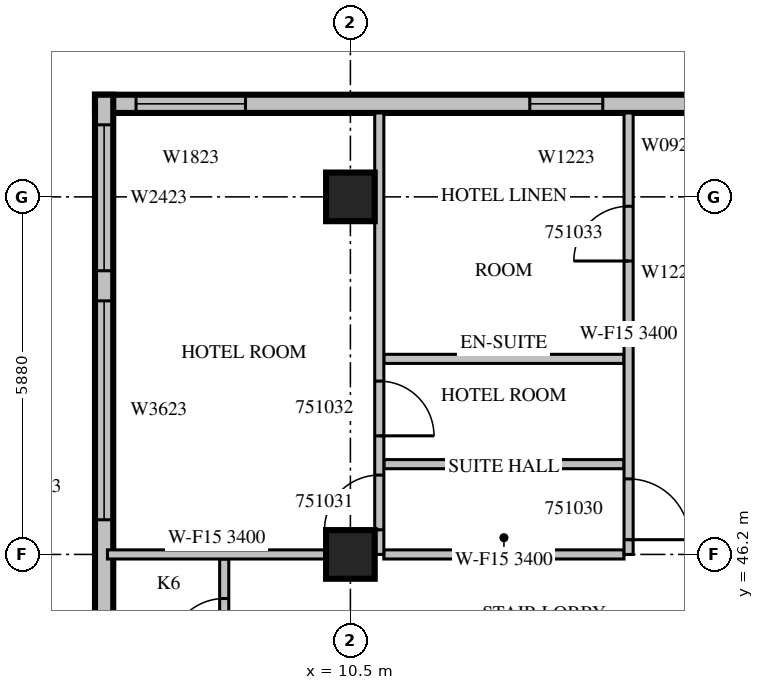
"""IFC4 building model, lengths in metres.
Left out: names, types, materials, properties, quantities, classifications, styles, units other than length and angle.
Written with IfcOpenShell. Run it as: python <this file> out.ifc"""

import sys

from ifc_helpers import new_model, si_unit, direction, frame, frame_2d, origin, origin_2d, place, context, subcontext, project, spatial, rectangle, extrude, source, transform, mapped, element, fill, save


model = new_model("IFC4")
c1 = context("Model", 3, precision=1e-05, world=origin(), true_north=direction((0.0, 1.0)))
c2 = subcontext(c1, "Body", "Model", "MODEL_VIEW")
j1 = project(units=[si_unit("LENGTHUNIT", "METRE"), si_unit("PLANEANGLEUNIT", "RADIAN")], contexts=[c1])
p1 = place(None, origin())
s1 = spatial("IfcSite", under=j1, at=p1, CompositionType="ELEMENT")
p2 = place(p1, origin())
s2 = spatial("IfcBuilding", under=s1, at=p2, CompositionType="ELEMENT")
p3 = place(p2, frame((0.0, 0.0, 227.2)))
s3 = spatial("IfcBuildingStorey", under=s2, at=p3, CompositionType="ELEMENT", Elevation=227.2)
m1 = source(origin(), c2, "Body", "SweptSolid", [
    extrude(rectangle(XDim=0.8, YDim=0.8, at=origin_2d()), origin(), (0.0, 0.0, 1.0), 3.8),
])
for number, where, z_axis, x_axis in (
    (1, (10.5, 46.2, 0.0), (0.0, 0.0, 1.0), (1.0, 0.0, 0.0)),
    (2, (10.5, 52.08, 0.0), (0.0, 0.0, 1.0), (1.0, 0.0, 0.0)),
):
    element("IfcColumn", number, at=place(p3, frame(where, z_axis=z_axis, x_axis=x_axis)), inside=s3, PredefinedType="COLUMN", context=c2, shape_type="MappedRepresentation", body=[
        mapped(m1, transform((0.0, 0.0, 0.0), scale=1.0)),
    ])
m2 = source(origin(), c2, "Body", "SweptSolid", [
    extrude(rectangle(XDim=10.5, YDim=0.3, at=frame_2d((5.25, 0.0))), origin(), (0.0, 0.0, 1.0), 3.4),
])
p4 = place(p3, frame((16.8, 53.61, 0.0), z_axis=(0.0, 0.0, 1.0), x_axis=(-1.0, 0.0, 0.0)))
e3 = element("IfcWall", 3, at=p4, inside=s3, PredefinedType="STANDARD", context=c2, shape_type="MappedRepresentation", body=[
    mapped(m2, transform((0.0, 0.0, 0.0), scale=1.0)),
])
m3 = source(origin(), c2, "Body", "SweptSolid", [
    extrude(rectangle(XDim=1.2, YDim=2.3, at=frame_2d((0.6, 1.15))), frame((0.0, 0.16, 0.0), z_axis=(0.0, -1.0, 0.0), x_axis=(1.0, 0.0, 0.0)), (0.0, 0.0, 1.0), 0.32),
])
p5 = place(p4, frame((2.15, 0.0, 0.6)))
e4 = element("IfcOpeningElement", 4, at=p5, cuts=e3, PredefinedType="OPENING", context=c2, shape_type="MappedRepresentation", body=[
    mapped(m3, transform((0.0, 0.0, 0.0), scale=1.0)),
])
m4 = source(origin(), c2, "Body", "SweptSolid", [
    extrude(rectangle(XDim=1.8, YDim=2.3, at=frame_2d((0.9, 1.15))), frame((0.0, 0.16, 0.0), z_axis=(0.0, -1.0, 0.0), x_axis=(1.0, 0.0, 0.0)), (0.0, 0.0, 1.0), 0.32),
])
p6 = place(p4, frame((8.025, 0.0, 0.6)))
e5 = element("IfcOpeningElement", 5, at=p6, cuts=e3, PredefinedType="OPENING", context=c2, shape_type="MappedRepresentation", body=[
    mapped(m4, transform((0.0, 0.0, 0.0), scale=1.0)),
])
m5 = source(origin(), c2, "Body", "SweptSolid", [
    extrude(rectangle(XDim=9.91, YDim=0.3, at=frame_2d((4.955, 0.0))), origin(), (0.0, 0.0, 1.0), 3.4),
])
p7 = place(p3, frame((6.45, 53.76, 0.0), z_axis=(0.0, 0.0, 1.0), x_axis=(0.0, -1.0, 0.0)))
e6 = element("IfcWall", 6, at=p7, inside=s3, PredefinedType="STANDARD", context=c2, shape_type="MappedRepresentation", body=[
    mapped(m5, transform((0.0, 0.0, 0.0), scale=1.0)),
])
m6 = source(origin(), c2, "Body", "SweptSolid", [
    extrude(rectangle(XDim=3.6, YDim=2.3, at=frame_2d((1.8, 1.15))), frame((0.0, 0.16, 0.0), z_axis=(0.0, -1.0, 0.0), x_axis=(1.0, 0.0, 0.0)), (0.0, 0.0, 1.0), 0.32),
])
p8 = place(p7, frame((3.39, 0.0, 0.6)))
e7 = element("IfcOpeningElement", 7, at=p8, cuts=e6, PredefinedType="OPENING", context=c2, shape_type="MappedRepresentation", body=[
    mapped(m6, transform((0.0, 0.0, 0.0), scale=1.0)),
])
m7 = source(origin(), c2, "Body", "SweptSolid", [
    extrude(rectangle(XDim=2.4, YDim=2.3, at=frame_2d((1.2, 1.15))), frame((0.0, 0.16, 0.0), z_axis=(0.0, -1.0, 0.0), x_axis=(1.0, 0.0, 0.0)), (0.0, 0.0, 1.0), 0.32),
])
p9 = place(p7, frame((0.495, 0.0, 0.6)))
e8 = element("IfcOpeningElement", 8, at=p9, cuts=e6, PredefinedType="OPENING", context=c2, shape_type="MappedRepresentation", body=[
    mapped(m7, transform((0.0, 0.0, 0.0), scale=1.0)),
])
m8 = source(origin(), c2, "Body", "SweptSolid", [
    extrude(rectangle(XDim=2.2, YDim=0.15, at=frame_2d((1.1, 0.0))), origin(), (0.0, 0.0, 1.0), 3.4),
])
p10 = place(p3, frame((8.425, 43.925, 0.0), z_axis=(0.0, 0.0, 1.0), x_axis=(0.0, 1.0, 0.0)))
e9 = element("IfcWall", 9, at=p10, inside=s3, PredefinedType="PARTITIONING", context=c2, shape_type="MappedRepresentation", body=[
    mapped(m8, transform((0.0, 0.0, 0.0), scale=1.0)),
])
m9 = source(origin(), c2, "Body", "SweptSolid", [
    extrude(rectangle(XDim=0.9, YDim=2.1, at=frame_2d((0.45, 1.05))), frame((0.0, 0.085, 0.0), z_axis=(0.0, -1.0, 0.0), x_axis=(1.0, 0.0, 0.0)), (0.0, 0.0, 1.0), 0.17),
])
p11 = place(p10, frame((0.65, 0.0, 0.0)))
e10 = element("IfcOpeningElement", 10, at=p11, cuts=e9, PredefinedType="OPENING", context=c2, shape_type="MappedRepresentation", body=[
    mapped(m9, transform((0.0, 0.0, 0.0), scale=1.0)),
])
m10 = source(origin(), c2, "Body", "SweptSolid", [
    extrude(rectangle(XDim=3.95, YDim=0.15, at=frame_2d((1.975, 0.0))), origin(), (0.0, 0.0, 1.0), 3.4),
])
for number, where, z_axis, x_axis in (
    (11, (15.0, 47.684, 0.0), (0.0, 0.0, 1.0), (-1.0, 0.0, 0.0)),
    (12, (15.0, 49.416, 0.0), (0.0, 0.0, 1.0), (-1.0, 0.0, 0.0)),
):
    element("IfcWall", number, at=place(p3, frame(where, z_axis=z_axis, x_axis=x_axis)), inside=s3, PredefinedType="PARTITIONING", context=c2, shape_type="MappedRepresentation", body=[
        mapped(m10, transform((0.0, 0.0, 0.0), scale=1.0)),
    ])
m11 = source(origin(), c2, "Body", "SweptSolid", [
    extrude(rectangle(XDim=3.596, YDim=0.15, at=frame_2d((1.798, 0.0))), origin(), (0.0, 0.0, 1.0), 3.4),
])
p12 = place(p3, frame((10.101, 46.2, 0.0), z_axis=(0.0, 0.0, 1.0), x_axis=(-1.0, 0.0, 0.0)))
e13 = element("IfcWall", 13, at=p12, inside=s3, PredefinedType="PARTITIONING", context=c2, shape_type="MappedRepresentation", body=[
    mapped(m11, transform((0.0, 0.0, 0.0), scale=1.0)),
])
p13 = place(p3, frame((15.0, 46.2, 0.0), z_axis=(0.0, 0.0, 1.0), x_axis=(-1.0, 0.0, 0.0)))
e14 = element("IfcWall", 14, at=p13, inside=s3, PredefinedType="PARTITIONING", context=c2, shape_type="MappedRepresentation", body=[
    mapped(m10, transform((0.0, 0.0, 0.0), scale=1.0)),
])
m12 = source(origin(), c2, "Body", "SweptSolid", [
    extrude(rectangle(XDim=7.26, YDim=0.15, at=frame_2d((3.63, 0.0))), origin(), (0.0, 0.0, 1.0), 3.4),
])
p14 = place(p3, frame((10.975, 46.2, 0.0), z_axis=(0.0, 0.0, 1.0), x_axis=(0.0, 1.0, 0.0)))
e15 = element("IfcWall", 15, at=p14, inside=s3, PredefinedType="PARTITIONING", context=c2, shape_type="MappedRepresentation", body=[
    mapped(m12, transform((0.0, 0.0, 0.0), scale=1.0)),
])
p15 = place(p14, frame((0.405, 0.0, 0.0)))
e16 = element("IfcOpeningElement", 16, at=p15, cuts=e15, PredefinedType="OPENING", context=c2, shape_type="MappedRepresentation", body=[
    mapped(m9, transform((0.0, 0.0, 0.0), scale=1.0)),
])
p16 = place(p14, frame((1.95, 0.0, 0.0)))
e17 = element("IfcOpeningElement", 17, at=p16, cuts=e15, PredefinedType="OPENING", context=c2, shape_type="MappedRepresentation", body=[
    mapped(m9, transform((0.0, 0.0, 0.0), scale=1.0)),
])
p17 = place(p3, frame((15.075, 46.2, 0.0), z_axis=(0.0, 0.0, 1.0), x_axis=(0.0, 1.0, 0.0)))
e18 = element("IfcWall", 18, at=p17, inside=s3, PredefinedType="PARTITIONING", context=c2, shape_type="MappedRepresentation", body=[
    mapped(m12, transform((0.0, 0.0, 0.0), scale=1.0)),
])
m13 = source(origin(), c2, "Body", "SweptSolid", [
    extrude(rectangle(XDim=1.0, YDim=2.1, at=frame_2d((0.5, 1.05))), frame((0.0, 0.085, 0.0), z_axis=(0.0, -1.0, 0.0), x_axis=(1.0, 0.0, 0.0)), (0.0, 0.0, 1.0), 0.17),
])
p18 = place(p17, frame((0.242, 0.0, 0.0)))
e19 = element("IfcOpeningElement", 19, at=p18, cuts=e18, PredefinedType="OPENING", context=c2, shape_type="MappedRepresentation", body=[
    mapped(m13, transform((0.0, 0.0, 0.0), scale=1.0)),
])
p19 = place(p17, frame((4.825, 0.0, 0.0)))
e20 = element("IfcOpeningElement", 20, at=p19, cuts=e18, PredefinedType="OPENING", context=c2, shape_type="MappedRepresentation", body=[
    mapped(m9, transform((0.0, 0.0, 0.0), scale=1.0)),
])
m14 = source(origin(), c2, "Body", "SweptSolid", [
    extrude(rectangle(XDim=1.2, YDim=2.3, at=frame_2d((0.6, 1.15))), frame((0.0, 0.03, 0.0), z_axis=(0.0, -1.0, 0.0), x_axis=(1.0, 0.0, 0.0)), (0.0, 0.0, 1.0), 0.06),
])
p20 = place(p5, origin())
e21 = element("IfcWindow", 21, at=p20, inside=s3, PartitioningType="SINGLE_PANEL", PredefinedType="WINDOW", context=c2, shape_type="MappedRepresentation", body=[
    mapped(m14, transform((0.0, 0.0, 0.0), scale=1.0)),
])
fill(e4, e21)
m15 = source(origin(), c2, "Body", "SweptSolid", [
    extrude(rectangle(XDim=1.8, YDim=2.3, at=frame_2d((0.9, 1.15))), frame((0.0, 0.03, 0.0), z_axis=(0.0, -1.0, 0.0), x_axis=(1.0, 0.0, 0.0)), (0.0, 0.0, 1.0), 0.06),
])
p21 = place(p6, origin())
e22 = element("IfcWindow", 22, at=p21, inside=s3, PartitioningType="SINGLE_PANEL", PredefinedType="WINDOW", context=c2, shape_type="MappedRepresentation", body=[
    mapped(m15, transform((0.0, 0.0, 0.0), scale=1.0)),
])
fill(e5, e22)
m16 = source(origin(), c2, "Body", "SweptSolid", [
    extrude(rectangle(XDim=3.6, YDim=2.3, at=frame_2d((1.8, 1.15))), frame((0.0, 0.03, 0.0), z_axis=(0.0, -1.0, 0.0), x_axis=(1.0, 0.0, 0.0)), (0.0, 0.0, 1.0), 0.06),
])
p22 = place(p8, origin())
e23 = element("IfcWindow", 23, at=p22, inside=s3, PartitioningType="SINGLE_PANEL", PredefinedType="WINDOW", context=c2, shape_type="MappedRepresentation", body=[
    mapped(m16, transform((0.0, 0.0, 0.0), scale=1.0)),
])
fill(e7, e23)
m17 = source(origin(), c2, "Body", "SweptSolid", [
    extrude(rectangle(XDim=2.4, YDim=2.3, at=frame_2d((1.2, 1.15))), frame((0.0, 0.03, 0.0), z_axis=(0.0, -1.0, 0.0), x_axis=(1.0, 0.0, 0.0)), (0.0, 0.0, 1.0), 0.06),
])
p23 = place(p9, origin())
e24 = element("IfcWindow", 24, at=p23, inside=s3, PartitioningType="SINGLE_PANEL", PredefinedType="WINDOW", context=c2, shape_type="MappedRepresentation", body=[
    mapped(m17, transform((0.0, 0.0, 0.0), scale=1.0)),
])
fill(e8, e24)
m18 = source(origin(), c2, "Body", "SweptSolid", [
    extrude(rectangle(XDim=0.9, YDim=2.1, at=frame_2d((0.45, 1.05))), frame((0.0, 0.025, 0.0), z_axis=(0.0, -1.0, 0.0), x_axis=(1.0, 0.0, 0.0)), (0.0, 0.0, 1.0), 0.05),
])
p24 = place(p11, origin())
e25 = element("IfcDoor", 25, at=p24, inside=s3, OperationType="SINGLE_SWING_LEFT", PredefinedType="DOOR", context=c2, shape_type="MappedRepresentation", body=[
    mapped(m18, transform((0.0, 0.0, 0.0), scale=1.0)),
])
fill(e10, e25)
m19 = source(origin(), c2, "Body", "SweptSolid", [
    extrude(rectangle(XDim=1.0, YDim=2.1, at=frame_2d((0.5, 1.05))), frame((0.0, 0.025, 0.0), z_axis=(0.0, -1.0, 0.0), x_axis=(1.0, 0.0, 0.0)), (0.0, 0.0, 1.0), 0.05),
])
p25 = place(p18, origin())
e26 = element("IfcDoor", 26, at=p25, inside=s3, OperationType="SINGLE_SWING_RIGHT", PredefinedType="DOOR", context=c2, shape_type="MappedRepresentation", body=[
    mapped(m19, transform((0.0, 0.0, 0.0), scale=1.0)),
])
fill(e19, e26)
p26 = place(p15, origin())
e27 = element("IfcDoor", 27, at=p26, inside=s3, OperationType="SINGLE_SWING_LEFT", PredefinedType="DOOR", context=c2, shape_type="MappedRepresentation", body=[
    mapped(m18, transform((0.0, 0.0, 0.0), scale=1.0)),
])
fill(e16, e27)
p27 = place(p16, origin())
e28 = element("IfcDoor", 28, at=p27, inside=s3, OperationType="SINGLE_SWING_RIGHT", PredefinedType="DOOR", context=c2, shape_type="MappedRepresentation", body=[
    mapped(m18, transform((0.0, 0.0, 0.0), scale=1.0)),
])
fill(e17, e28)
p28 = place(p19, origin())
e29 = element("IfcDoor", 29, at=p28, inside=s3, OperationType="SINGLE_SWING_LEFT", PredefinedType="DOOR", context=c2, shape_type="MappedRepresentation", body=[
    mapped(m18, transform((0.0, 0.0, 0.0), scale=1.0)),
])
fill(e20, e29)
save(model, sys.argv[1])
